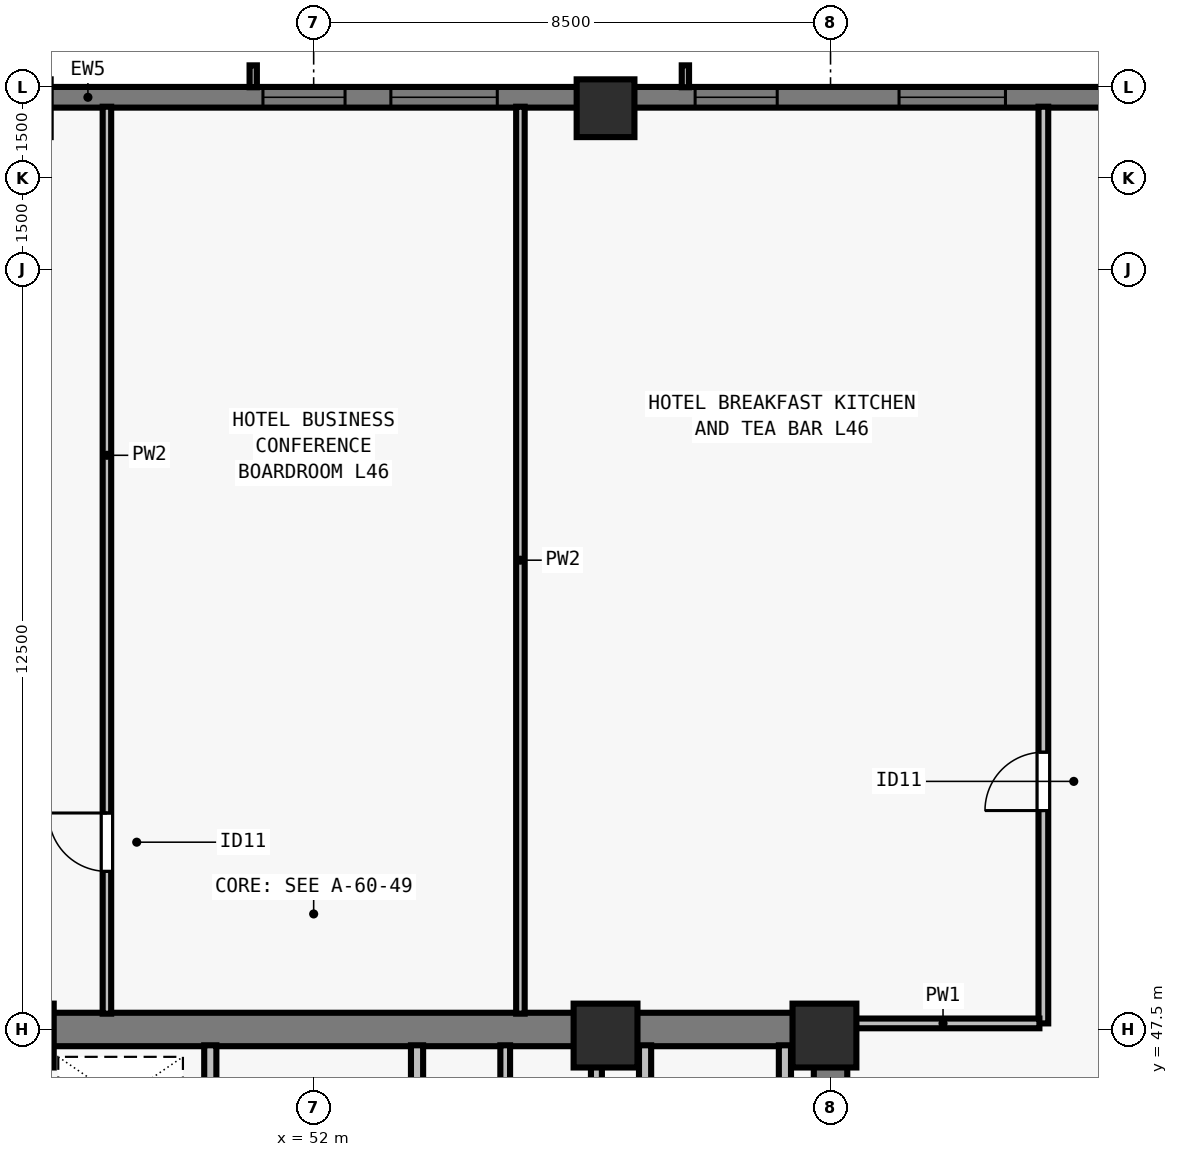
"""IFC4 building model, lengths in metres.
Left out: names, types, materials, properties, quantities, classifications, styles, units other than length and angle.
Written with IfcOpenShell. Run it as: python <this file> out.ifc"""

import sys

from ifc_helpers import new_model, si_unit, direction, frame, frame_2d, origin, origin_2d, place, context, subcontext, project, spatial, rectangle, extrude, element, fill, save


model = new_model("IFC4")
c1 = context("Model", 3, precision=1e-05, world=origin(), true_north=direction((0.0, 1.0)))
c2 = subcontext(c1, "Body", "Model", "MODEL_VIEW")
j1 = project(units=[si_unit("LENGTHUNIT", "METRE"), si_unit("PLANEANGLEUNIT", "RADIAN")], contexts=[c1])
p1 = place(None, origin())
s1 = spatial("IfcSite", under=j1, at=p1, CompositionType="ELEMENT")
p2 = place(p1, origin())
s2 = spatial("IfcBuilding", under=s1, at=p2, CompositionType="ELEMENT")
p3 = place(p2, frame((0.0, 0.0, 169.0)))
s3 = spatial("IfcBuildingStorey", under=s2, at=p3, CompositionType="ELEMENT", Elevation=169.0)
for number, where, z_axis, x_axis in (
    (1, (47.2, 47.4, 0.0), (0.0, 0.0, 1.0), (1.0, 0.0, 0.0)),
    (2, (56.8, 47.4, 0.0), (0.0, 0.0, 1.0), (1.0, 0.0, 0.0)),
    (3, (60.4, 47.4, 0.0), (0.0, 0.0, 1.0), (1.0, 0.0, 0.0)),
):
    element("IfcColumn", number, at=place(p3, frame(where, z_axis=z_axis, x_axis=x_axis)), inside=s3, PredefinedType="COLUMN", context=c2, shape_type="SweptSolid", body=[
        extrude(rectangle(XDim=1.05, YDim=1.05, at=origin_2d()), origin(), (0.0, 0.0, 1.0), 3.5),
    ])
p4 = place(p3, frame((56.8, 62.65, 0.0), z_axis=(0.0, 0.0, 1.0), x_axis=(1.0, 0.0, 0.0)))
e4 = element("IfcColumn", 4, at=p4, inside=s3, PredefinedType="COLUMN", context=c2, shape_type="SweptSolid", body=[
    extrude(rectangle(XDim=0.95, YDim=0.95, at=origin_2d()), origin(), (0.0, 0.0, 1.0), 3.5),
])
p5 = place(p3, frame((32.0, 62.83, 0.0), z_axis=(0.0, 0.0, 1.0), x_axis=(1.0, 0.0, 0.0)))
e5 = element("IfcWall", 5, at=p5, inside=s3, PredefinedType="SOLIDWALL", context=c2, shape_type="SweptSolid", body=[
    extrude(rectangle(XDim=39.682, YDim=0.34, at=frame_2d((19.841, 0.0))), origin(), (0.0, 0.0, 1.0), 3.28),
])
p6 = place(p5, frame((4.952, 0.0, 0.8)))
e6 = element("IfcOpeningElement", 6, at=p6, cuts=e5, PredefinedType="OPENING", context=c2, shape_type="SweptSolid", body=[
    extrude(rectangle(XDim=1.35, YDim=1.66, at=frame_2d((0.675, 0.83))), frame((0.0, 0.18, 0.0), z_axis=(0.0, -1.0, 0.0), x_axis=(1.0, 0.0, 0.0)), (0.0, 0.0, 1.0), 0.36),
])
p7 = place(p5, frame((12.059, 0.0, 0.8)))
e7 = element("IfcOpeningElement", 7, at=p7, cuts=e5, PredefinedType="OPENING", context=c2, shape_type="SweptSolid", body=[
    extrude(rectangle(XDim=1.35, YDim=1.66, at=frame_2d((0.675, 0.83))), frame((0.0, 0.18, 0.0), z_axis=(0.0, -1.0, 0.0), x_axis=(1.0, 0.0, 0.0)), (0.0, 0.0, 1.0), 0.36),
])
p8 = place(p5, frame((19.166, 0.0, 0.8)))
e8 = element("IfcOpeningElement", 8, at=p8, cuts=e5, PredefinedType="OPENING", context=c2, shape_type="SweptSolid", body=[
    extrude(rectangle(XDim=1.35, YDim=1.66, at=frame_2d((0.675, 0.83))), frame((0.0, 0.18, 0.0), z_axis=(0.0, -1.0, 0.0), x_axis=(1.0, 0.0, 0.0)), (0.0, 0.0, 1.0), 0.36),
])
p9 = place(p5, frame((21.27, 0.0, 0.8)))
e9 = element("IfcOpeningElement", 9, at=p9, cuts=e5, PredefinedType="OPENING", context=c2, shape_type="SweptSolid", body=[
    extrude(rectangle(XDim=1.75, YDim=1.66, at=frame_2d((0.875, 0.83))), frame((0.0, 0.18, 0.0), z_axis=(0.0, -1.0, 0.0), x_axis=(1.0, 0.0, 0.0)), (0.0, 0.0, 1.0), 0.36),
])
p10 = place(p5, frame((26.273, 0.0, 0.8)))
e10 = element("IfcOpeningElement", 10, at=p10, cuts=e5, PredefinedType="OPENING", context=c2, shape_type="SweptSolid", body=[
    extrude(rectangle(XDim=1.35, YDim=1.66, at=frame_2d((0.675, 0.83))), frame((0.0, 0.18, 0.0), z_axis=(0.0, -1.0, 0.0), x_axis=(1.0, 0.0, 0.0)), (0.0, 0.0, 1.0), 0.36),
])
p11 = place(p5, frame((29.627, 0.0, 0.8)))
e11 = element("IfcOpeningElement", 11, at=p11, cuts=e5, PredefinedType="OPENING", context=c2, shape_type="SweptSolid", body=[
    extrude(rectangle(XDim=1.75, YDim=1.66, at=frame_2d((0.875, 0.83))), frame((0.0, 0.18, 0.0), z_axis=(0.0, -1.0, 0.0), x_axis=(1.0, 0.0, 0.0)), (0.0, 0.0, 1.0), 0.36),
])
p12 = place(p5, frame((34.47, 0.0, 0.8)))
e12 = element("IfcOpeningElement", 12, at=p12, cuts=e5, PredefinedType="OPENING", context=c2, shape_type="SweptSolid", body=[
    extrude(rectangle(XDim=0.9, YDim=1.66, at=frame_2d((0.45, 0.83))), frame((0.0, 0.18, 0.0), z_axis=(0.0, -1.0, 0.0), x_axis=(1.0, 0.0, 0.0)), (0.0, 0.0, 1.0), 0.36),
])
p13 = place(p3, frame((43.225, 47.5, 0.0), z_axis=(0.0, 0.0, 1.0), x_axis=(1.0, 0.0, 0.0)))
e13 = element("IfcWall", 13, at=p13, inside=s3, PredefinedType="SHEAR", context=c2, shape_type="SweptSolid", body=[
    extrude(rectangle(XDim=17.55, YDim=0.55, at=frame_2d((8.775, 0.0))), origin(), (0.0, 0.0, 1.0), 3.28),
])
p14 = place(p3, frame((60.5, 40.8, 0.0), z_axis=(0.0, 0.0, 1.0), x_axis=(0.0, 1.0, 0.0)))
e14 = element("IfcWall", 14, at=p14, inside=s3, PredefinedType="SHEAR", context=c2, shape_type="SweptSolid", body=[
    extrude(rectangle(XDim=6.435, YDim=0.55, at=frame_2d((3.218, 0.0))), origin(), (0.0, 0.0, 1.0), 3.28),
])
p15 = place(p3, frame((50.3, 40.585, 0.0), z_axis=(0.0, 0.0, 1.0), x_axis=(0.0, 1.0, 0.0)))
e15 = element("IfcWall", 15, at=p15, inside=s3, PredefinedType="SOLIDWALL", context=c2, shape_type="SweptSolid", body=[
    extrude(rectangle(XDim=6.655, YDim=0.2, at=frame_2d((3.328, 0.0))), origin(), (0.0, 0.0, 1.0), 3.28),
])
p16 = place(p15, frame((5.065, 0.0, 0.0)))
e16 = element("IfcOpeningElement", 16, at=p16, cuts=e15, PredefinedType="OPENING", context=c2, shape_type="SweptSolid", body=[
    extrude(rectangle(XDim=0.8, YDim=2.08, at=frame_2d((0.4, 1.04))), frame((0.0, 0.11, 0.0), z_axis=(0.0, -1.0, 0.0), x_axis=(1.0, 0.0, 0.0)), (0.0, 0.0, 1.0), 0.22),
])
p17 = place(p3, frame((53.7, 40.585, 0.0), z_axis=(0.0, 0.0, 1.0), x_axis=(0.0, 1.0, 0.0)))
e17 = element("IfcWall", 17, at=p17, inside=s3, PredefinedType="SOLIDWALL", context=c2, shape_type="SweptSolid", body=[
    extrude(rectangle(XDim=6.655, YDim=0.2, at=frame_2d((3.328, 0.0))), origin(), (0.0, 0.0, 1.0), 3.28),
])
p18 = place(p17, frame((0.195, 0.0, 0.0)))
e18 = element("IfcOpeningElement", 18, at=p18, cuts=e17, PredefinedType="OPENING", context=c2, shape_type="SweptSolid", body=[
    extrude(rectangle(XDim=0.8, YDim=2.08, at=frame_2d((0.4, 1.04))), frame((0.0, 0.11, 0.0), z_axis=(0.0, -1.0, 0.0), x_axis=(1.0, 0.0, 0.0)), (0.0, 0.0, 1.0), 0.22),
])
p19 = place(p17, frame((4.265, 0.0, 0.0)))
e19 = element("IfcOpeningElement", 19, at=p19, cuts=e17, PredefinedType="OPENING", context=c2, shape_type="SweptSolid", body=[
    extrude(rectangle(XDim=0.95, YDim=2.12, at=frame_2d((0.475, 1.06))), frame((0.0, 0.11, 0.0), z_axis=(0.0, -1.0, 0.0), x_axis=(1.0, 0.0, 0.0)), (0.0, 0.0, 1.0), 0.22),
])
for number, where, z_axis, x_axis in (
    (20, (57.45, 43.735, 0.0), (0.0, 0.0, 1.0), (0.0, 1.0, 0.0)),
    (21, (59.75, 43.735, 0.0), (0.0, 0.0, 1.0), (0.0, 1.0, 0.0)),
):
    element("IfcWall", number, at=place(p3, frame(where, z_axis=z_axis, x_axis=x_axis)), inside=s3, PredefinedType="SOLIDWALL", context=c2, shape_type="SweptSolid", body=[
        extrude(rectangle(XDim=3.505, YDim=0.2, at=frame_2d((1.752, 0.0))), origin(), (0.0, 0.0, 1.0), 3.28),
    ])
p20 = place(p3, frame((56.65, 43.735, 0.0), z_axis=(0.0, 0.0, 1.0), x_axis=(0.0, 1.0, 0.0)))
e22 = element("IfcWall", 22, at=p20, inside=s3, PredefinedType="SOLIDWALL", context=c2, shape_type="SweptSolid", body=[
    extrude(rectangle(XDim=3.505, YDim=0.18, at=frame_2d((1.752, 0.0))), origin(), (0.0, 0.0, 1.0), 3.28),
])
p21 = place(p3, frame((55.15, 44.195, 0.0), z_axis=(0.0, 0.0, 1.0), x_axis=(0.0, 1.0, 0.0)))
e23 = element("IfcWall", 23, at=p21, inside=s3, PredefinedType="PARTITIONING", context=c2, shape_type="SweptSolid", body=[
    extrude(rectangle(XDim=3.045, YDim=0.16, at=frame_2d((1.522, 0.0))), origin(), (0.0, 0.0, 1.0), 3.28),
])
p22 = place(p21, frame((1.025, 0.0, 0.0)))
e24 = element("IfcOpeningElement", 24, at=p22, cuts=e23, PredefinedType="OPENING", context=c2, shape_type="SweptSolid", body=[
    extrude(rectangle(XDim=0.8, YDim=2.1, at=frame_2d((0.4, 1.05))), frame((0.0, 0.09, 0.0), z_axis=(0.0, -1.0, 0.0), x_axis=(1.0, 0.0, 0.0)), (0.0, 0.0, 1.0), 0.18),
])
p23 = place(p3, frame((64.0, 47.6, 0.0), z_axis=(0.0, 0.0, 1.0), x_axis=(0.0, 1.0, 0.0)))
e25 = element("IfcWall", 25, at=p23, inside=s3, PredefinedType="PARTITIONING", context=c2, shape_type="SweptSolid", body=[
    extrude(rectangle(XDim=15.075, YDim=0.16, at=frame_2d((7.538, 0.0))), origin(), (0.0, 0.0, 1.0), 2.555),
])
p24 = place(p23, frame((3.5, 0.0, 0.0)))
e26 = element("IfcOpeningElement", 26, at=p24, cuts=e25, PredefinedType="OPENING", context=c2, shape_type="SweptSolid", body=[
    extrude(rectangle(XDim=0.96, YDim=2.12, at=frame_2d((0.48, 1.06))), frame((0.0, 0.09, 0.0), z_axis=(0.0, -1.0, 0.0), x_axis=(1.0, 0.0, 0.0)), (0.0, 0.0, 1.0), 0.18),
])
p25 = place(p3, frame((60.765, 47.6, 0.0), z_axis=(0.0, 0.0, 1.0), x_axis=(1.0, 0.0, 0.0)))
e27 = element("IfcWall", 27, at=p25, inside=s3, PredefinedType="PARTITIONING", context=c2, shape_type="SweptSolid", body=[
    extrude(rectangle(XDim=3.17, YDim=0.16, at=frame_2d((1.585, 0.0))), origin(), (0.0, 0.0, 1.0), 3.28),
])
p26 = place(p3, frame((48.6, 47.76, 0.0), z_axis=(0.0, 0.0, 1.0), x_axis=(0.0, 1.0, 0.0)))
e28 = element("IfcWall", 28, at=p26, inside=s3, PredefinedType="PARTITIONING", context=c2, shape_type="SweptSolid", body=[
    extrude(rectangle(XDim=14.915, YDim=0.14, at=frame_2d((7.458, 0.0))), origin(), (0.0, 0.0, 1.0), 2.896),
])
p27 = place(p26, frame((2.34, 0.0, 0.0)))
e29 = element("IfcOpeningElement", 29, at=p27, cuts=e28, PredefinedType="OPENING", context=c2, shape_type="SweptSolid", body=[
    extrude(rectangle(XDim=0.96, YDim=2.12, at=frame_2d((0.48, 1.06))), frame((0.0, 0.08, 0.0), z_axis=(0.0, -1.0, 0.0), x_axis=(1.0, 0.0, 0.0)), (0.0, 0.0, 1.0), 0.16),
])
p28 = place(p3, frame((55.4, 47.76, 0.0), z_axis=(0.0, 0.0, 1.0), x_axis=(0.0, 1.0, 0.0)))
e30 = element("IfcWall", 30, at=p28, inside=s3, PredefinedType="PARTITIONING", context=c2, shape_type="SweptSolid", body=[
    extrude(rectangle(XDim=14.915, YDim=0.14, at=frame_2d((7.458, 0.0))), origin(), (0.0, 0.0, 1.0), 2.896),
])
p29 = place(p8, origin())
e31 = element("IfcWindow", 31, at=p29, inside=s3, PartitioningType="SINGLE_PANEL", PredefinedType="WINDOW", context=c2, shape_type="SweptSolid", body=[
    extrude(rectangle(XDim=1.35, YDim=1.66, at=frame_2d((0.675, 0.83))), frame((0.0, -0.05, 0.0), z_axis=(0.0, -1.0, 0.0), x_axis=(1.0, 0.0, 0.0)), (0.0, 0.0, 1.0), 0.06),
])
fill(e8, e31)
p30 = place(p9, origin())
e32 = element("IfcWindow", 32, at=p30, inside=s3, PartitioningType="SINGLE_PANEL", PredefinedType="WINDOW", context=c2, shape_type="SweptSolid", body=[
    extrude(rectangle(XDim=1.75, YDim=1.66, at=frame_2d((0.875, 0.83))), frame((0.0, -0.05, 0.0), z_axis=(0.0, -1.0, 0.0), x_axis=(1.0, 0.0, 0.0)), (0.0, 0.0, 1.0), 0.06),
])
fill(e9, e32)
p31 = place(p10, origin())
e33 = element("IfcWindow", 33, at=p31, inside=s3, PartitioningType="SINGLE_PANEL", PredefinedType="WINDOW", context=c2, shape_type="SweptSolid", body=[
    extrude(rectangle(XDim=1.35, YDim=1.66, at=frame_2d((0.675, 0.83))), frame((0.0, -0.05, 0.0), z_axis=(0.0, -1.0, 0.0), x_axis=(1.0, 0.0, 0.0)), (0.0, 0.0, 1.0), 0.06),
])
fill(e10, e33)
p32 = place(p11, origin())
e34 = element("IfcWindow", 34, at=p32, inside=s3, PartitioningType="SINGLE_PANEL", PredefinedType="WINDOW", context=c2, shape_type="SweptSolid", body=[
    extrude(rectangle(XDim=1.75, YDim=1.66, at=frame_2d((0.875, 0.83))), frame((0.0, -0.05, 0.0), z_axis=(0.0, -1.0, 0.0), x_axis=(1.0, 0.0, 0.0)), (0.0, 0.0, 1.0), 0.06),
])
fill(e11, e34)
p33 = place(p24, origin())
e35 = element("IfcDoor", 35, at=p33, inside=s3, OperationType="SINGLE_SWING_LEFT", PredefinedType="DOOR", context=c2, shape_type="SweptSolid", body=[
    extrude(rectangle(XDim=0.96, YDim=2.12, at=frame_2d((0.48, 1.06))), frame((0.0, 0.025, 0.0), z_axis=(0.0, -1.0, 0.0), x_axis=(1.0, 0.0, 0.0)), (0.0, 0.0, 1.0), 0.05),
])
fill(e26, e35)
p34 = place(p27, origin())
e36 = element("IfcDoor", 36, at=p34, inside=s3, OperationType="SINGLE_SWING_RIGHT", PredefinedType="DOOR", context=c2, shape_type="SweptSolid", body=[
    extrude(rectangle(XDim=0.96, YDim=2.12, at=frame_2d((0.48, 1.06))), frame((0.0, 0.025, 0.0), z_axis=(0.0, -1.0, 0.0), x_axis=(1.0, 0.0, 0.0)), (0.0, 0.0, 1.0), 0.05),
])
fill(e29, e36)
save(model, sys.argv[1])
